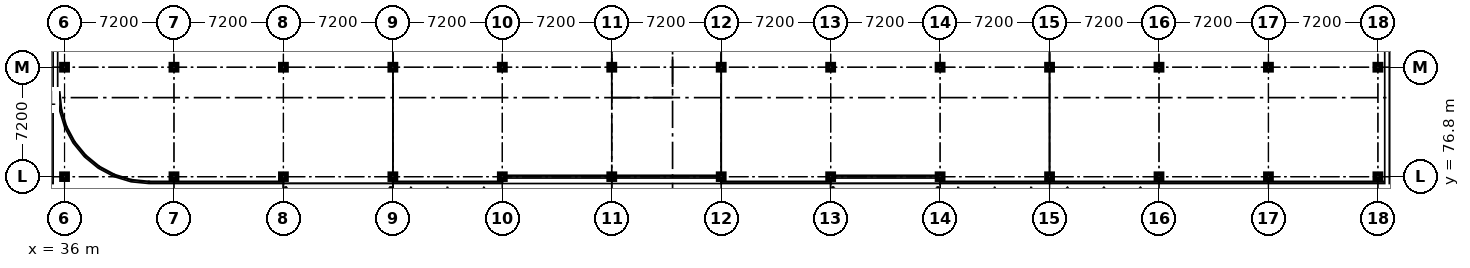
"""IFC4 building model, lengths in metres.
Left out: names, types, materials, properties, quantities, classifications, styles, units other than length and angle.
Written with IfcOpenShell. Run it as: python <this file> out.ifc"""

import sys

from ifc_helpers import new_model, si_unit, direction, frame, origin, origin_2d, place, context, subcontext, project, spatial, i_section, extrude, element, save


model = new_model("IFC4")
c1 = context("Model", 3, precision=1e-05, world=origin(), true_north=direction((0.0, 1.0)))
c2 = subcontext(c1, "Body", "Model", "MODEL_VIEW")
j1 = project(units=[si_unit("LENGTHUNIT", "METRE"), si_unit("PLANEANGLEUNIT", "RADIAN")], contexts=[c1])
p1 = place(None, origin())
s1 = spatial("IfcSite", under=j1, at=p1, CompositionType="ELEMENT")
p2 = place(p1, origin())
s2 = spatial("IfcBuilding", under=s1, at=p2, CompositionType="ELEMENT")
p3 = place(p2, frame((0.0, 0.0, 5.4)))
s3 = spatial("IfcBuildingStorey", under=s2, at=p3, CompositionType="ELEMENT", Elevation=5.4)
p4 = place(p3, frame((36.0, 76.8, 0.0), z_axis=(0.0, 0.0, 1.0), x_axis=(1.0, 0.0, 0.0)))
e1 = element("IfcColumn", 1, at=p4, inside=s3, PredefinedType="COLUMN", context=c2, shape_type="SweptSolid", body=[
    extrude(i_section(OverallWidth=0.396, OverallDepth=0.381, WebThickness=0.019, FlangeThickness=0.03, FilletRadius=0.015, at=origin_2d()), origin(), (0.0, 0.0, 1.0), 3.9),
])
p5 = place(p3, frame((36.0, 84.0, 0.0), z_axis=(0.0, 0.0, 1.0), x_axis=(1.0, 0.0, 0.0)))
e2 = element("IfcColumn", 2, at=p5, inside=s3, PredefinedType="COLUMN", context=c2, shape_type="SweptSolid", body=[
    extrude(i_section(OverallWidth=0.399, OverallDepth=0.394, WebThickness=0.023, FlangeThickness=0.037, FilletRadius=0.015, at=origin_2d()), origin(), (0.0, 0.0, 1.0), 3.9),
])
p6 = place(p3, frame((43.2, 76.8, 0.0), z_axis=(0.0, 0.0, 1.0), x_axis=(1.0, 0.0, 0.0)))
e3 = element("IfcColumn", 3, at=p6, inside=s3, PredefinedType="COLUMN", context=c2, shape_type="SweptSolid", body=[
    extrude(i_section(OverallWidth=0.396, OverallDepth=0.381, WebThickness=0.019, FlangeThickness=0.03, FilletRadius=0.015, at=origin_2d()), origin(), (0.0, 0.0, 1.0), 3.9),
])
p7 = place(p3, frame((43.2, 84.0, 0.0), z_axis=(0.0, 0.0, 1.0), x_axis=(1.0, 0.0, 0.0)))
e4 = element("IfcColumn", 4, at=p7, inside=s3, PredefinedType="COLUMN", context=c2, shape_type="SweptSolid", body=[
    extrude(i_section(OverallWidth=0.399, OverallDepth=0.394, WebThickness=0.023, FlangeThickness=0.037, FilletRadius=0.015, at=origin_2d()), origin(), (0.0, 0.0, 1.0), 3.9),
])
p8 = place(p3, frame((50.4, 76.8, 0.0), z_axis=(0.0, 0.0, 1.0), x_axis=(1.0, 0.0, 0.0)))
e5 = element("IfcColumn", 5, at=p8, inside=s3, PredefinedType="COLUMN", context=c2, shape_type="SweptSolid", body=[
    extrude(i_section(OverallWidth=0.396, OverallDepth=0.381, WebThickness=0.019, FlangeThickness=0.03, FilletRadius=0.015, at=origin_2d()), origin(), (0.0, 0.0, 1.0), 3.9),
])
p9 = place(p3, frame((50.4, 84.0, 0.0), z_axis=(0.0, 0.0, 1.0), x_axis=(1.0, 0.0, 0.0)))
e6 = element("IfcColumn", 6, at=p9, inside=s3, PredefinedType="COLUMN", context=c2, shape_type="SweptSolid", body=[
    extrude(i_section(OverallWidth=0.399, OverallDepth=0.394, WebThickness=0.023, FlangeThickness=0.037, FilletRadius=0.015, at=origin_2d()), origin(), (0.0, 0.0, 1.0), 3.9),
])
p10 = place(p3, frame((57.6, 76.8, 0.0), z_axis=(0.0, 0.0, 1.0), x_axis=(1.0, 0.0, 0.0)))
e7 = element("IfcColumn", 7, at=p10, inside=s3, PredefinedType="COLUMN", context=c2, shape_type="SweptSolid", body=[
    extrude(i_section(OverallWidth=0.396, OverallDepth=0.381, WebThickness=0.019, FlangeThickness=0.03, FilletRadius=0.015, at=origin_2d()), origin(), (0.0, 0.0, 1.0), 3.9),
])
p11 = place(p3, frame((57.6, 84.0, 0.0), z_axis=(0.0, 0.0, 1.0), x_axis=(1.0, 0.0, 0.0)))
e8 = element("IfcColumn", 8, at=p11, inside=s3, PredefinedType="COLUMN", context=c2, shape_type="SweptSolid", body=[
    extrude(i_section(OverallWidth=0.399, OverallDepth=0.394, WebThickness=0.023, FlangeThickness=0.037, FilletRadius=0.015, at=origin_2d()), origin(), (0.0, 0.0, 1.0), 3.9),
])
p12 = place(p3, frame((64.8, 76.8, 0.0), z_axis=(0.0, 0.0, 1.0), x_axis=(1.0, 0.0, 0.0)))
e9 = element("IfcColumn", 9, at=p12, inside=s3, PredefinedType="COLUMN", context=c2, shape_type="SweptSolid", body=[
    extrude(i_section(OverallWidth=0.396, OverallDepth=0.381, WebThickness=0.019, FlangeThickness=0.03, FilletRadius=0.015, at=origin_2d()), origin(), (0.0, 0.0, 1.0), 3.9),
])
p13 = place(p3, frame((64.8, 84.0, 0.0), z_axis=(0.0, 0.0, 1.0), x_axis=(1.0, 0.0, 0.0)))
e10 = element("IfcColumn", 10, at=p13, inside=s3, PredefinedType="COLUMN", context=c2, shape_type="SweptSolid", body=[
    extrude(i_section(OverallWidth=0.399, OverallDepth=0.394, WebThickness=0.023, FlangeThickness=0.037, FilletRadius=0.015, at=origin_2d()), origin(), (0.0, 0.0, 1.0), 3.9),
])
p14 = place(p3, frame((72.0, 76.8, 0.0), z_axis=(0.0, 0.0, 1.0), x_axis=(1.0, 0.0, 0.0)))
e11 = element("IfcColumn", 11, at=p14, inside=s3, PredefinedType="COLUMN", context=c2, shape_type="SweptSolid", body=[
    extrude(i_section(OverallWidth=0.396, OverallDepth=0.381, WebThickness=0.019, FlangeThickness=0.03, FilletRadius=0.015, at=origin_2d()), origin(), (0.0, 0.0, 1.0), 3.9),
])
p15 = place(p3, frame((72.0, 84.0, 0.0), z_axis=(0.0, 0.0, 1.0), x_axis=(1.0, 0.0, 0.0)))
e12 = element("IfcColumn", 12, at=p15, inside=s3, PredefinedType="COLUMN", context=c2, shape_type="SweptSolid", body=[
    extrude(i_section(OverallWidth=0.399, OverallDepth=0.394, WebThickness=0.023, FlangeThickness=0.037, FilletRadius=0.015, at=origin_2d()), origin(), (0.0, 0.0, 1.0), 3.9),
])
p16 = place(p3, frame((79.2, 76.8, 0.0), z_axis=(0.0, 0.0, 1.0), x_axis=(1.0, 0.0, 0.0)))
e13 = element("IfcColumn", 13, at=p16, inside=s3, PredefinedType="COLUMN", context=c2, shape_type="SweptSolid", body=[
    extrude(i_section(OverallWidth=0.396, OverallDepth=0.381, WebThickness=0.019, FlangeThickness=0.03, FilletRadius=0.015, at=origin_2d()), origin(), (0.0, 0.0, 1.0), 3.9),
])
p17 = place(p3, frame((79.2, 84.0, 0.0), z_axis=(0.0, 0.0, 1.0), x_axis=(1.0, 0.0, 0.0)))
e14 = element("IfcColumn", 14, at=p17, inside=s3, PredefinedType="COLUMN", context=c2, shape_type="SweptSolid", body=[
    extrude(i_section(OverallWidth=0.399, OverallDepth=0.394, WebThickness=0.023, FlangeThickness=0.037, FilletRadius=0.015, at=origin_2d()), origin(), (0.0, 0.0, 1.0), 3.9),
])
p18 = place(p3, frame((86.4, 76.8, 0.0), z_axis=(0.0, 0.0, 1.0), x_axis=(1.0, 0.0, 0.0)))
e15 = element("IfcColumn", 15, at=p18, inside=s3, PredefinedType="COLUMN", context=c2, shape_type="SweptSolid", body=[
    extrude(i_section(OverallWidth=0.396, OverallDepth=0.381, WebThickness=0.019, FlangeThickness=0.03, FilletRadius=0.015, at=origin_2d()), origin(), (0.0, 0.0, 1.0), 3.9),
])
p19 = place(p3, frame((86.4, 84.0, 0.0), z_axis=(0.0, 0.0, 1.0), x_axis=(1.0, 0.0, 0.0)))
e16 = element("IfcColumn", 16, at=p19, inside=s3, PredefinedType="COLUMN", context=c2, shape_type="SweptSolid", body=[
    extrude(i_section(OverallWidth=0.399, OverallDepth=0.394, WebThickness=0.023, FlangeThickness=0.037, FilletRadius=0.015, at=origin_2d()), origin(), (0.0, 0.0, 1.0), 3.9),
])
p20 = place(p3, frame((93.6, 76.8, 0.0), z_axis=(0.0, 0.0, 1.0), x_axis=(1.0, 0.0, 0.0)))
e17 = element("IfcColumn", 17, at=p20, inside=s3, PredefinedType="COLUMN", context=c2, shape_type="SweptSolid", body=[
    extrude(i_section(OverallWidth=0.396, OverallDepth=0.381, WebThickness=0.019, FlangeThickness=0.03, FilletRadius=0.015, at=origin_2d()), origin(), (0.0, 0.0, 1.0), 3.9),
])
p21 = place(p3, frame((93.6, 84.0, 0.0), z_axis=(0.0, 0.0, 1.0), x_axis=(1.0, 0.0, 0.0)))
e18 = element("IfcColumn", 18, at=p21, inside=s3, PredefinedType="COLUMN", context=c2, shape_type="SweptSolid", body=[
    extrude(i_section(OverallWidth=0.399, OverallDepth=0.394, WebThickness=0.023, FlangeThickness=0.037, FilletRadius=0.015, at=origin_2d()), origin(), (0.0, 0.0, 1.0), 3.9),
])
p22 = place(p3, frame((100.8, 76.8, 0.0), z_axis=(0.0, 0.0, 1.0), x_axis=(1.0, 0.0, 0.0)))
e19 = element("IfcColumn", 19, at=p22, inside=s3, PredefinedType="COLUMN", context=c2, shape_type="SweptSolid", body=[
    extrude(i_section(OverallWidth=0.396, OverallDepth=0.381, WebThickness=0.019, FlangeThickness=0.03, FilletRadius=0.015, at=origin_2d()), origin(), (0.0, 0.0, 1.0), 3.9),
])
p23 = place(p3, frame((100.8, 84.0, 0.0), z_axis=(0.0, 0.0, 1.0), x_axis=(1.0, 0.0, 0.0)))
e20 = element("IfcColumn", 20, at=p23, inside=s3, PredefinedType="COLUMN", context=c2, shape_type="SweptSolid", body=[
    extrude(i_section(OverallWidth=0.399, OverallDepth=0.394, WebThickness=0.023, FlangeThickness=0.037, FilletRadius=0.015, at=origin_2d()), origin(), (0.0, 0.0, 1.0), 3.9),
])
p24 = place(p3, frame((108.0, 76.8, 0.0), z_axis=(0.0, 0.0, 1.0), x_axis=(1.0, 0.0, 0.0)))
e21 = element("IfcColumn", 21, at=p24, inside=s3, PredefinedType="COLUMN", context=c2, shape_type="SweptSolid", body=[
    extrude(i_section(OverallWidth=0.396, OverallDepth=0.381, WebThickness=0.019, FlangeThickness=0.03, FilletRadius=0.015, at=origin_2d()), origin(), (0.0, 0.0, 1.0), 3.9),
])
p25 = place(p3, frame((108.0, 84.0, 0.0), z_axis=(0.0, 0.0, 1.0), x_axis=(1.0, 0.0, 0.0)))
e22 = element("IfcColumn", 22, at=p25, inside=s3, PredefinedType="COLUMN", context=c2, shape_type="SweptSolid", body=[
    extrude(i_section(OverallWidth=0.399, OverallDepth=0.394, WebThickness=0.023, FlangeThickness=0.037, FilletRadius=0.015, at=origin_2d()), origin(), (0.0, 0.0, 1.0), 3.9),
])
p26 = place(p3, frame((115.2, 76.8, 0.0), z_axis=(0.0, 0.0, 1.0), x_axis=(1.0, 0.0, 0.0)))
e23 = element("IfcColumn", 23, at=p26, inside=s3, PredefinedType="COLUMN", context=c2, shape_type="SweptSolid", body=[
    extrude(i_section(OverallWidth=0.396, OverallDepth=0.381, WebThickness=0.019, FlangeThickness=0.03, FilletRadius=0.015, at=origin_2d()), origin(), (0.0, 0.0, 1.0), 3.9),
])
p27 = place(p3, frame((115.2, 84.0, 0.0), z_axis=(0.0, 0.0, 1.0), x_axis=(1.0, 0.0, 0.0)))
e24 = element("IfcColumn", 24, at=p27, inside=s3, PredefinedType="COLUMN", context=c2, shape_type="SweptSolid", body=[
    extrude(i_section(OverallWidth=0.399, OverallDepth=0.394, WebThickness=0.023, FlangeThickness=0.037, FilletRadius=0.015, at=origin_2d()), origin(), (0.0, 0.0, 1.0), 3.9),
])
p28 = place(p3, frame((122.4, 76.8, 0.0), z_axis=(0.0, 0.0, 1.0), x_axis=(1.0, 0.0, 0.0)))
e25 = element("IfcColumn", 25, at=p28, inside=s3, PredefinedType="COLUMN", context=c2, shape_type="SweptSolid", body=[
    extrude(i_section(OverallWidth=0.396, OverallDepth=0.381, WebThickness=0.019, FlangeThickness=0.03, FilletRadius=0.015, at=origin_2d()), origin(), (0.0, 0.0, 1.0), 3.9),
])
p29 = place(p3, frame((122.4, 84.0, 0.0), z_axis=(0.0, 0.0, 1.0), x_axis=(1.0, 0.0, 0.0)))
e26 = element("IfcColumn", 26, at=p29, inside=s3, PredefinedType="COLUMN", context=c2, shape_type="SweptSolid", body=[
    extrude(i_section(OverallWidth=0.399, OverallDepth=0.394, WebThickness=0.023, FlangeThickness=0.037, FilletRadius=0.015, at=origin_2d()), origin(), (0.0, 0.0, 1.0), 3.9),
])
save(model, sys.argv[1])
